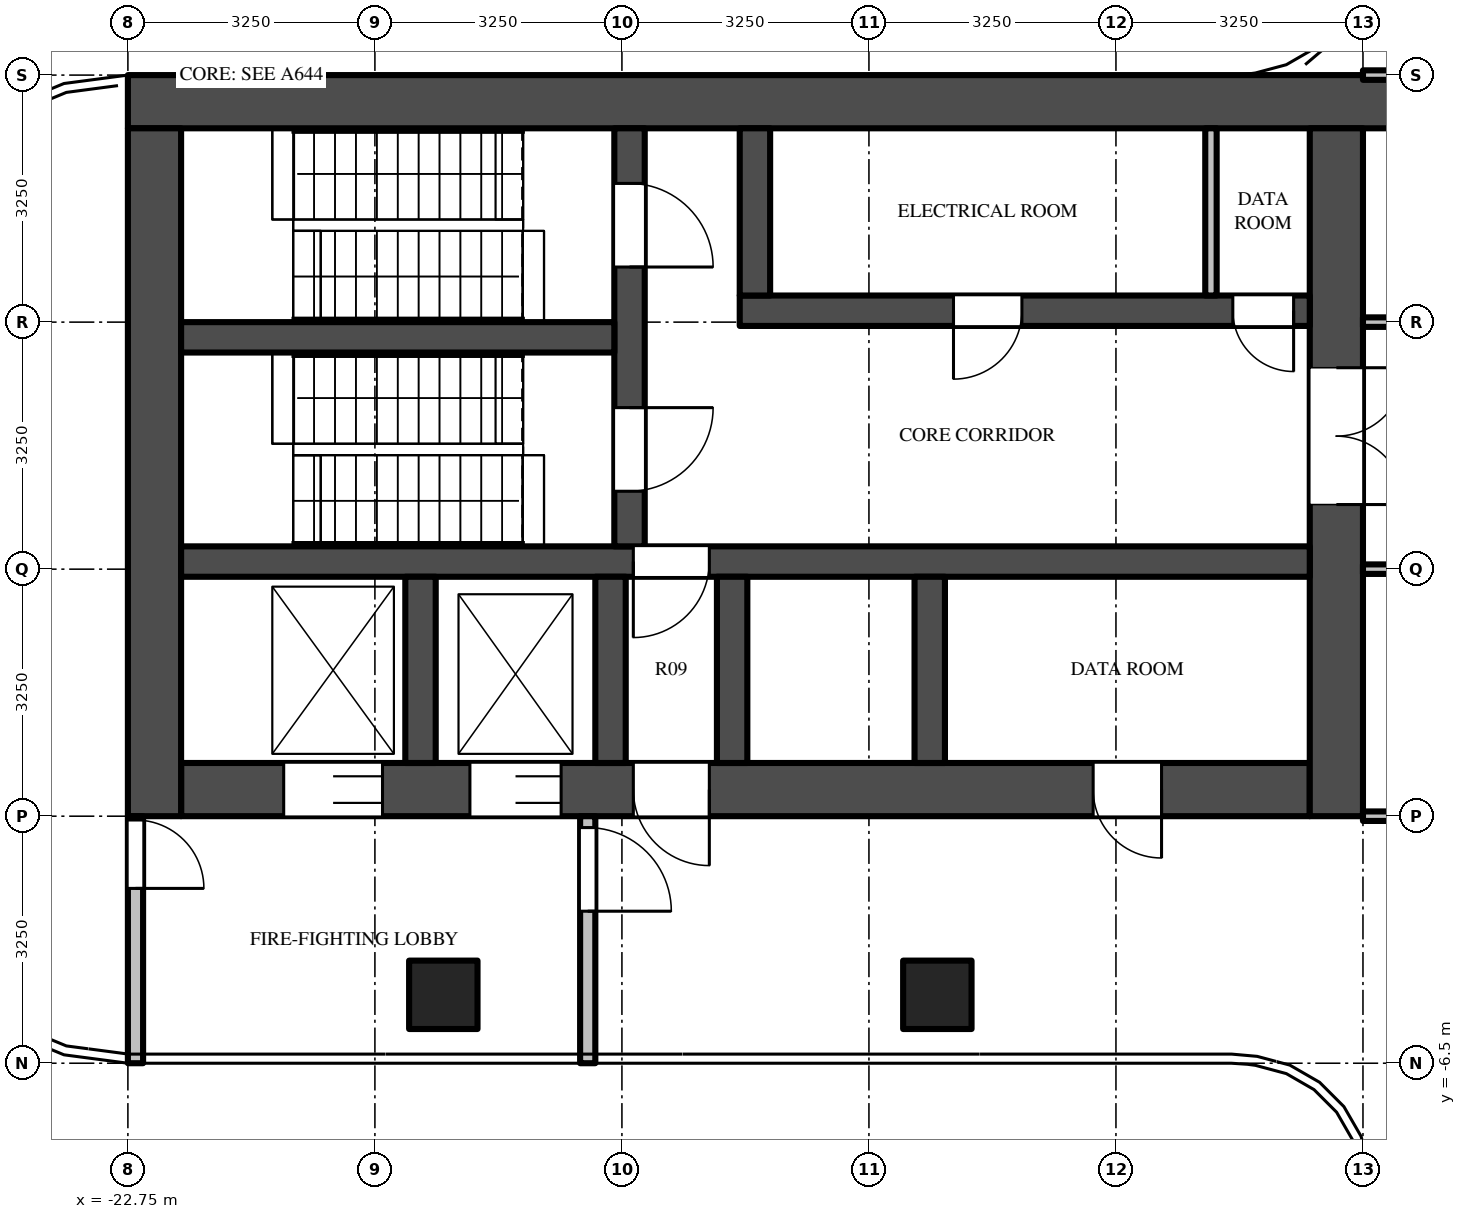
"""IFC4 building model, lengths in metres.
Left out: names, types, materials, properties, quantities, classifications, styles, units other than length and angle.
Written with IfcOpenShell. Run it as: python <this file> out.ifc"""

import sys

from ifc_helpers import new_model, si_unit, direction, frame, frame_2d, origin, origin_2d, place, context, subcontext, project, spatial, rectangle, extrude, source, transform, mapped, element, fill, save


model = new_model("IFC4")
c1 = context("Model", 3, precision=1e-05, world=origin(), true_north=direction((0.0, 1.0)))
c2 = subcontext(c1, "Body", "Model", "MODEL_VIEW")
j1 = project(units=[si_unit("LENGTHUNIT", "METRE"), si_unit("PLANEANGLEUNIT", "RADIAN")], contexts=[c1])
p1 = place(None, origin())
s1 = spatial("IfcSite", under=j1, at=p1, CompositionType="ELEMENT")
p2 = place(p1, origin())
s2 = spatial("IfcBuilding", under=s1, at=p2, CompositionType="ELEMENT")
p3 = place(p2, frame((0.0, 0.0, 330.1)))
s3 = spatial("IfcBuildingStorey", under=s2, at=p3, CompositionType="ELEMENT", Elevation=330.1)
m1 = source(origin(), c2, "Body", "SweptSolid", [
    extrude(rectangle(XDim=0.9, YDim=0.9, at=origin_2d()), origin(), (0.0, 0.0, 1.0), 8.0),
])
for number, where, z_axis, x_axis in (
    (1, (-12.1, -5.6, 0.0), (0.0, 0.0, 1.0), (1.0, 0.0, 0.0)),
    (2, (-18.6, -5.6, 0.0), (0.0, 0.0, 1.0), (1.0, 0.0, 0.0)),
):
    element("IfcColumn", number, at=place(p3, frame(where, z_axis=z_axis, x_axis=x_axis)), inside=s3, PredefinedType="COLUMN", context=c2, shape_type="MappedRepresentation", body=[
        mapped(m1, transform((0.0, 0.0, 0.0))),
    ])
m2 = source(origin(), c2, "Body", "SweptSolid", [
    extrude(rectangle(XDim=16.7, YDim=0.7, at=frame_2d((8.35, 0.0))), origin(), (0.0, 0.0, 1.0), 7.75),
])
p4 = place(p3, frame((-6.05, 6.15, 0.0), z_axis=(0.0, 0.0, 1.0), x_axis=(-1.0, 0.0, 0.0)))
e3 = element("IfcWall", 3, at=p4, inside=s3, PredefinedType="SHEAR", context=c2, shape_type="MappedRepresentation", body=[
    mapped(m2, transform((0.0, 0.0, 0.0))),
])
m3 = source(origin(), c2, "Body", "SweptSolid", [
    extrude(rectangle(XDim=14.85, YDim=0.7, at=frame_2d((7.425, 0.0))), origin(), (0.0, 0.0, 1.0), 7.75),
])
p5 = place(p3, frame((-7.2, -2.9, 0.0), z_axis=(0.0, 0.0, 1.0), x_axis=(-1.0, 0.0, 0.0)))
e4 = element("IfcWall", 4, at=p5, inside=s3, PredefinedType="SHEAR", context=c2, shape_type="MappedRepresentation", body=[
    mapped(m3, transform((0.0, 0.0, 0.0))),
])
m4 = source(origin(), c2, "Body", "SweptSolid", [
    extrude(rectangle(XDim=1.3, YDim=2.1, at=frame_2d((0.65, 1.05))), frame((0.0, 0.36, 0.0), z_axis=(0.0, -1.0, 0.0), x_axis=(1.0, 0.0, 0.0)), (0.0, 0.0, 1.0), 0.72),
])
p6 = place(p5, frame((12.2, 0.0, 0.0)))
e5 = element("IfcOpeningElement", 5, at=p6, cuts=e4, PredefinedType="OPENING", context=c2, shape_type="MappedRepresentation", body=[
    mapped(m4, transform((0.0, 0.0, 0.0))),
])
m5 = source(origin(), c2, "Body", "SweptSolid", [
    extrude(rectangle(XDim=1.2, YDim=2.1, at=frame_2d((0.6, 1.05))), frame((0.0, 0.36, 0.0), z_axis=(0.0, -1.0, 0.0), x_axis=(1.0, 0.0, 0.0)), (0.0, 0.0, 1.0), 0.72),
])
p7 = place(p5, frame((9.85, 0.0, 0.0)))
e6 = element("IfcOpeningElement", 6, at=p7, cuts=e4, PredefinedType="OPENING", context=c2, shape_type="MappedRepresentation", body=[
    mapped(m5, transform((0.0, 0.0, 0.0))),
])
m6 = source(origin(), c2, "Body", "SweptSolid", [
    extrude(rectangle(XDim=1.0, YDim=2.1, at=frame_2d((0.5, 1.05))), frame((0.0, 0.36, 0.0), z_axis=(0.0, -1.0, 0.0), x_axis=(1.0, 0.0, 0.0)), (0.0, 0.0, 1.0), 0.72),
])
p8 = place(p5, frame((7.9, 0.0, 0.0)))
e7 = element("IfcOpeningElement", 7, at=p8, cuts=e4, PredefinedType="OPENING", context=c2, shape_type="MappedRepresentation", body=[
    mapped(m6, transform((0.0, 0.0, 0.0))),
])
m7 = source(origin(), c2, "Body", "SweptSolid", [
    extrude(rectangle(XDim=0.9, YDim=2.1, at=frame_2d((0.45, 1.05))), frame((0.0, 0.36, 0.0), z_axis=(0.0, -1.0, 0.0), x_axis=(1.0, 0.0, 0.0)), (0.0, 0.0, 1.0), 0.72),
])
p9 = place(p5, frame((1.95, 0.0, 0.0)))
e8 = element("IfcOpeningElement", 8, at=p9, cuts=e4, PredefinedType="OPENING", context=c2, shape_type="MappedRepresentation", body=[
    mapped(m7, transform((0.0, 0.0, 0.0))),
])
m8 = source(origin(), c2, "Body", "SweptSolid", [
    extrude(rectangle(XDim=9.05, YDim=0.7, at=frame_2d((4.525, 0.0))), origin(), (0.0, 0.0, 1.0), 7.75),
])
p10 = place(p3, frame((-6.85, 5.8, 0.0), z_axis=(0.0, 0.0, 1.0), x_axis=(0.0, -1.0, 0.0)))
e9 = element("IfcWall", 9, at=p10, inside=s3, PredefinedType="SHEAR", context=c2, shape_type="MappedRepresentation", body=[
    mapped(m8, transform((0.0, 0.0, 0.0))),
])
m9 = source(origin(), c2, "Body", "SweptSolid", [
    extrude(rectangle(XDim=1.8, YDim=2.1, at=frame_2d((0.9, 1.05))), frame((0.0, 0.36, 0.0), z_axis=(0.0, -1.0, 0.0), x_axis=(1.0, 0.0, 0.0)), (0.0, 0.0, 1.0), 0.72),
])
p11 = place(p10, frame((3.15, 0.0, 0.0)))
e10 = element("IfcOpeningElement", 10, at=p11, cuts=e9, PredefinedType="OPENING", context=c2, shape_type="MappedRepresentation", body=[
    mapped(m9, transform((0.0, 0.0, 0.0))),
])
p12 = place(p3, frame((-22.4, 5.8, 0.0), z_axis=(0.0, 0.0, 1.0), x_axis=(0.0, -1.0, 0.0)))
e11 = element("IfcWall", 11, at=p12, inside=s3, PredefinedType="SHEAR", context=c2, shape_type="MappedRepresentation", body=[
    mapped(m8, transform((0.0, 0.0, 0.0))),
])
m10 = source(origin(), c2, "Body", "SweptSolid", [
    extrude(rectangle(XDim=7.5, YDim=0.4, at=frame_2d((3.75, 0.0))), origin(), (0.0, 0.0, 1.0), 7.75),
])
p13 = place(p3, frame((-7.2, 3.4, 0.0), z_axis=(0.0, 0.0, 1.0), x_axis=(-1.0, 0.0, 0.0)))
e12 = element("IfcWall", 12, at=p13, inside=s3, PredefinedType="SHEAR", context=c2, shape_type="MappedRepresentation", body=[
    mapped(m10, transform((0.0, 0.0, 0.0))),
])
m11 = source(origin(), c2, "Body", "SweptSolid", [
    extrude(rectangle(XDim=0.8, YDim=2.1, at=frame_2d((0.4, 1.05))), frame((0.0, 0.21, 0.0), z_axis=(0.0, -1.0, 0.0), x_axis=(1.0, 0.0, 0.0)), (0.0, 0.0, 1.0), 0.42),
])
p14 = place(p13, frame((0.212, 0.0, 0.0)))
e13 = element("IfcOpeningElement", 13, at=p14, cuts=e12, PredefinedType="OPENING", context=c2, shape_type="MappedRepresentation", body=[
    mapped(m11, transform((0.0, 0.0, 0.0))),
])
m12 = source(origin(), c2, "Body", "SweptSolid", [
    extrude(rectangle(XDim=0.9, YDim=2.1, at=frame_2d((0.45, 1.05))), frame((0.0, 0.21, 0.0), z_axis=(0.0, -1.0, 0.0), x_axis=(1.0, 0.0, 0.0)), (0.0, 0.0, 1.0), 0.42),
])
p15 = place(p13, frame((3.788, 0.0, 0.0)))
e14 = element("IfcOpeningElement", 14, at=p15, cuts=e12, PredefinedType="OPENING", context=c2, shape_type="MappedRepresentation", body=[
    mapped(m12, transform((0.0, 0.0, 0.0))),
])
m13 = source(origin(), c2, "Body", "SweptSolid", [
    extrude(rectangle(XDim=14.85, YDim=0.4, at=frame_2d((7.425, 0.0))), origin(), (0.0, 0.0, 1.0), 7.75),
])
p16 = place(p3, frame((-7.2, 0.1, 0.0), z_axis=(0.0, 0.0, 1.0), x_axis=(-1.0, 0.0, 0.0)))
e15 = element("IfcWall", 15, at=p16, inside=s3, PredefinedType="SHEAR", context=c2, shape_type="MappedRepresentation", body=[
    mapped(m13, transform((0.0, 0.0, 0.0))),
])
m14 = source(origin(), c2, "Body", "SweptSolid", [
    extrude(rectangle(XDim=1.0, YDim=2.1, at=frame_2d((0.5, 1.05))), frame((0.0, 0.21, 0.0), z_axis=(0.0, -1.0, 0.0), x_axis=(1.0, 0.0, 0.0)), (0.0, 0.0, 1.0), 0.42),
])
p17 = place(p16, frame((7.9, 0.0, 0.0)))
e16 = element("IfcOpeningElement", 16, at=p17, cuts=e15, PredefinedType="OPENING", context=c2, shape_type="MappedRepresentation", body=[
    mapped(m14, transform((0.0, 0.0, 0.0))),
])
m15 = source(origin(), c2, "Body", "SweptSolid", [
    extrude(rectangle(XDim=5.5, YDim=0.4, at=frame_2d((2.75, 0.0))), origin(), (0.0, 0.0, 1.0), 7.75),
])
p18 = place(p3, frame((-16.15, 5.8, 0.0), z_axis=(0.0, 0.0, 1.0), x_axis=(0.0, -1.0, 0.0)))
e17 = element("IfcWall", 17, at=p18, inside=s3, PredefinedType="SHEAR", context=c2, shape_type="MappedRepresentation", body=[
    mapped(m15, transform((0.0, 0.0, 0.0))),
])
m16 = source(origin(), c2, "Body", "SweptSolid", [
    extrude(rectangle(XDim=1.1, YDim=2.1, at=frame_2d((0.55, 1.05))), frame((0.0, 0.21, 0.0), z_axis=(0.0, -1.0, 0.0), x_axis=(1.0, 0.0, 0.0)), (0.0, 0.0, 1.0), 0.42),
])
p19 = place(p18, frame((0.725, 0.0, 0.0)))
e18 = element("IfcOpeningElement", 18, at=p19, cuts=e17, PredefinedType="OPENING", context=c2, shape_type="MappedRepresentation", body=[
    mapped(m16, transform((0.0, 0.0, 0.0))),
])
p20 = place(p18, frame((3.675, 0.0, 0.0)))
e19 = element("IfcOpeningElement", 19, at=p20, cuts=e17, PredefinedType="OPENING", context=c2, shape_type="MappedRepresentation", body=[
    mapped(m16, transform((0.0, 0.0, 0.0))),
])
m17 = source(origin(), c2, "Body", "SweptSolid", [
    extrude(rectangle(XDim=5.7, YDim=0.4, at=frame_2d((2.85, 0.0))), origin(), (0.0, 0.0, 1.0), 7.75),
])
p21 = place(p3, frame((-16.35, 3.05, 0.0), z_axis=(0.0, 0.0, 1.0), x_axis=(-1.0, 0.0, 0.0)))
e20 = element("IfcWall", 20, at=p21, inside=s3, PredefinedType="SHEAR", context=c2, shape_type="MappedRepresentation", body=[
    mapped(m17, transform((0.0, 0.0, 0.0))),
])
m18 = source(origin(), c2, "Body", "SweptSolid", [
    extrude(rectangle(XDim=2.2, YDim=0.4, at=frame_2d((1.1, 0.0))), origin(), (0.0, 0.0, 1.0), 7.75),
])
p22 = place(p3, frame((-14.5, 5.8, 0.0), z_axis=(0.0, 0.0, 1.0), x_axis=(0.0, -1.0, 0.0)))
e21 = element("IfcWall", 21, at=p22, inside=s3, PredefinedType="SHEAR", context=c2, shape_type="MappedRepresentation", body=[
    mapped(m18, transform((0.0, 0.0, 0.0))),
])
m19 = source(origin(), c2, "Body", "SweptSolid", [
    extrude(rectangle(XDim=2.45, YDim=0.4, at=frame_2d((1.225, 0.0))), origin(), (0.0, 0.0, 1.0), 7.75),
])
for number, where, z_axis, x_axis in (
    (22, (-12.2, -0.1, 0.0), (0.0, 0.0, 1.0), (0.0, -1.0, 0.0)),
    (23, (-14.8, -0.1, 0.0), (0.0, 0.0, 1.0), (0.0, -1.0, 0.0)),
    (24, (-16.4, -0.1, 0.0), (0.0, 0.0, 1.0), (0.0, -1.0, 0.0)),
    (25, (-18.9, -0.1, 0.0), (0.0, 0.0, 1.0), (0.0, -1.0, 0.0)),
):
    element("IfcWall", number, at=place(p3, frame(where, z_axis=z_axis, x_axis=x_axis)), inside=s3, PredefinedType="SHEAR", context=c2, shape_type="MappedRepresentation", body=[
        mapped(m19, transform((0.0, 0.0, 0.0))),
    ])
m20 = source(origin(), c2, "Body", "SweptSolid", [
    extrude(rectangle(XDim=3.25, YDim=0.2, at=frame_2d((1.625, 0.0))), origin(), (0.0, 0.0, 1.0), 7.75),
])
p23 = place(p3, frame((-16.7, -3.25, 0.0), z_axis=(0.0, 0.0, 1.0), x_axis=(0.0, -1.0, 0.0)))
e26 = element("IfcWall", 26, at=p23, inside=s3, PredefinedType="PARTITIONING", context=c2, shape_type="MappedRepresentation", body=[
    mapped(m20, transform((0.0, 0.0, 0.0))),
])
m21 = source(origin(), c2, "Body", "SweptSolid", [
    extrude(rectangle(XDim=1.1, YDim=2.1, at=frame_2d((0.55, 1.05))), frame((0.0, 0.11, 0.0), z_axis=(0.0, -1.0, 0.0), x_axis=(1.0, 0.0, 0.0)), (0.0, 0.0, 1.0), 0.22),
])
p24 = place(p23, frame((0.15, 0.0, 0.0)))
e27 = element("IfcOpeningElement", 27, at=p24, cuts=e26, PredefinedType="OPENING", context=c2, shape_type="MappedRepresentation", body=[
    mapped(m21, transform((0.0, 0.0, 0.0))),
])
p25 = place(p3, frame((-22.65, -3.25, 0.0), z_axis=(0.0, 0.0, 1.0), x_axis=(0.0, -1.0, 0.0)))
e28 = element("IfcWall", 28, at=p25, inside=s3, PredefinedType="PARTITIONING", context=c2, shape_type="MappedRepresentation", body=[
    mapped(m20, transform((0.0, 0.0, 0.0))),
])
m22 = source(origin(), c2, "Body", "SweptSolid", [
    extrude(rectangle(XDim=0.9, YDim=2.1, at=frame_2d((0.45, 1.05))), frame((0.0, 0.11, 0.0), z_axis=(0.0, -1.0, 0.0), x_axis=(1.0, 0.0, 0.0)), (0.0, 0.0, 1.0), 0.22),
])
p26 = place(p25, frame((0.05, 0.0, 0.0)))
e29 = element("IfcOpeningElement", 29, at=p26, cuts=e28, PredefinedType="OPENING", context=c2, shape_type="MappedRepresentation", body=[
    mapped(m22, transform((0.0, 0.0, 0.0))),
])
m23 = source(origin(), c2, "Body", "SweptSolid", [
    extrude(rectangle(XDim=2.2, YDim=0.15, at=frame_2d((1.1, 0.0))), origin(), (0.0, 0.0, 1.0), 7.75),
])
p27 = place(p3, frame((-8.5, 5.8, 0.0), z_axis=(0.0, 0.0, 1.0), x_axis=(0.0, -1.0, 0.0)))
e30 = element("IfcWall", 30, at=p27, inside=s3, PredefinedType="PARTITIONING", context=c2, shape_type="MappedRepresentation", body=[
    mapped(m23, transform((0.0, 0.0, 0.0))),
])
m24 = source(origin(), c2, "Body", "SweptSolid", [
    extrude(rectangle(XDim=5.363, YDim=0.125, at=frame_2d((2.681, 0.0))), origin(), (0.0, 0.0, 1.0), 7.046),
])
p28 = place(p3, frame((-1.137, -3.25, 0.0), z_axis=(0.0, 0.0, 1.0), x_axis=(-1.0, 0.0, 0.0)))
e31 = element("IfcWall", 31, at=p28, inside=s3, PredefinedType="PARTITIONING", context=c2, shape_type="MappedRepresentation", body=[
    mapped(m24, transform((0.0, 0.0, 0.0))),
])
m25 = source(origin(), c2, "Body", "SweptSolid", [
    extrude(rectangle(XDim=1.0, YDim=2.1, at=frame_2d((0.5, 1.05))), frame((0.0, 0.073, 0.0), z_axis=(0.0, -1.0, 0.0), x_axis=(1.0, 0.0, 0.0)), (0.0, 0.0, 1.0), 0.145),
])
p29 = place(p28, frame((4.012, 0.0, 0.0)))
e32 = element("IfcOpeningElement", 32, at=p29, cuts=e31, PredefinedType="OPENING", context=c2, shape_type="MappedRepresentation", body=[
    mapped(m25, transform((0.0, 0.0, 0.0))),
])
p30 = place(p3, frame((-6.5, 0.0, 0.0), z_axis=(0.0, 0.0, 1.0), x_axis=(1.0, 0.0, 0.0)))
e33 = element("IfcWall", 33, at=p30, inside=s3, PredefinedType="PARTITIONING", context=c2, shape_type="MappedRepresentation", body=[
    mapped(m24, transform((0.0, 0.0, 0.0))),
])
p31 = place(p3, frame((-6.5, 3.25, 0.0), z_axis=(0.0, 0.0, 1.0), x_axis=(1.0, 0.0, 0.0)))
e34 = element("IfcWall", 34, at=p31, inside=s3, PredefinedType="PARTITIONING", context=c2, shape_type="MappedRepresentation", body=[
    mapped(m24, transform((0.0, 0.0, 0.0))),
])
p32 = place(p31, frame((1.3, 0.0, 0.0)))
e35 = element("IfcOpeningElement", 35, at=p32, cuts=e34, PredefinedType="OPENING", context=c2, shape_type="MappedRepresentation", body=[
    mapped(m25, transform((0.0, 0.0, 0.0))),
])
m26 = source(origin(), c2, "Body", "SweptSolid", [
    extrude(rectangle(XDim=5.363, YDim=0.125, at=frame_2d((2.681, 0.0))), origin(), (0.0, 0.0, 1.0), 6.83),
])
p33 = place(p3, frame((-6.5, 6.5, 0.0), z_axis=(0.0, 0.0, 1.0), x_axis=(1.0, 0.0, 0.0)))
e36 = element("IfcWall", 36, at=p33, inside=s3, PredefinedType="PARTITIONING", context=c2, shape_type="MappedRepresentation", body=[
    mapped(m26, transform((0.0, 0.0, 0.0))),
])
m27 = source(origin(), c2, "Body", "SweptSolid", [
    extrude(rectangle(XDim=1.3, YDim=2.1, at=frame_2d((0.65, 1.05))), frame((0.0, -0.275, 0.0), z_axis=(0.0, -1.0, 0.0), x_axis=(1.0, 0.0, 0.0)), (0.0, 0.0, 1.0), 0.05),
])
p34 = place(p6, origin())
e37 = element("IfcDoor", 37, at=p34, inside=s3, OperationType="DOUBLE_DOOR_SLIDING", PredefinedType="DOOR", context=c2, shape_type="MappedRepresentation", body=[
    mapped(m27, transform((0.0, 0.0, 0.0))),
])
fill(e5, e37)
m28 = source(origin(), c2, "Body", "SweptSolid", [
    extrude(rectangle(XDim=1.2, YDim=2.1, at=frame_2d((0.6, 1.05))), frame((0.0, -0.275, 0.0), z_axis=(0.0, -1.0, 0.0), x_axis=(1.0, 0.0, 0.0)), (0.0, 0.0, 1.0), 0.05),
])
p35 = place(p7, origin())
e38 = element("IfcDoor", 38, at=p35, inside=s3, OperationType="DOUBLE_DOOR_SLIDING", PredefinedType="DOOR", context=c2, shape_type="MappedRepresentation", body=[
    mapped(m28, transform((0.0, 0.0, 0.0))),
])
fill(e6, e38)
m29 = source(origin(), c2, "Body", "SweptSolid", [
    extrude(rectangle(XDim=1.8, YDim=2.1, at=frame_2d((0.9, 1.05))), frame((0.0, -0.275, 0.0), z_axis=(0.0, -1.0, 0.0), x_axis=(1.0, 0.0, 0.0)), (0.0, 0.0, 1.0), 0.05),
])
p36 = place(p11, origin())
e39 = element("IfcDoor", 39, at=p36, inside=s3, OperationType="DOUBLE_DOOR_SINGLE_SWING", PredefinedType="DOOR", context=c2, shape_type="MappedRepresentation", body=[
    mapped(m29, transform((0.0, 0.0, 0.0))),
])
fill(e10, e39)
m30 = source(origin(), c2, "Body", "SweptSolid", [
    extrude(rectangle(XDim=1.1, YDim=2.1, at=frame_2d((0.55, 1.05))), frame((0.0, 0.025, 0.0), z_axis=(0.0, -1.0, 0.0), x_axis=(1.0, 0.0, 0.0)), (0.0, 0.0, 1.0), 0.05),
])
p37 = place(p19, origin())
e40 = element("IfcDoor", 40, at=p37, inside=s3, OperationType="SINGLE_SWING_RIGHT", PredefinedType="DOOR", context=c2, shape_type="MappedRepresentation", body=[
    mapped(m30, transform((0.0, 0.0, 0.0))),
])
fill(e18, e40)
p38 = place(p20, origin())
e41 = element("IfcDoor", 41, at=p38, inside=s3, OperationType="SINGLE_SWING_LEFT", PredefinedType="DOOR", context=c2, shape_type="MappedRepresentation", body=[
    mapped(m30, transform((0.0, 0.0, 0.0))),
])
fill(e19, e41)
m31 = source(origin(), c2, "Body", "SweptSolid", [
    extrude(rectangle(XDim=1.0, YDim=2.1, at=frame_2d((0.5, 1.05))), frame((0.0, 0.025, 0.0), z_axis=(0.0, -1.0, 0.0), x_axis=(1.0, 0.0, 0.0)), (0.0, 0.0, 1.0), 0.05),
])
p39 = place(p17, origin())
e42 = element("IfcDoor", 42, at=p39, inside=s3, OperationType="SINGLE_SWING_RIGHT", PredefinedType="DOOR", context=c2, shape_type="MappedRepresentation", body=[
    mapped(m31, transform((0.0, 0.0, 0.0))),
])
fill(e16, e42)
m32 = source(origin(), c2, "Body", "SweptSolid", [
    extrude(rectangle(XDim=1.0, YDim=2.1, at=frame_2d((0.5, 1.05))), frame((0.0, -0.275, 0.0), z_axis=(0.0, -1.0, 0.0), x_axis=(1.0, 0.0, 0.0)), (0.0, 0.0, 1.0), 0.05),
])
p40 = place(p8, origin())
e43 = element("IfcDoor", 43, at=p40, inside=s3, OperationType="SINGLE_SWING_LEFT", PredefinedType="DOOR", context=c2, shape_type="MappedRepresentation", body=[
    mapped(m32, transform((0.0, 0.0, 0.0))),
])
fill(e7, e43)
p41 = place(p24, origin())
e44 = element("IfcDoor", 44, at=p41, inside=s3, OperationType="SINGLE_SWING_RIGHT", PredefinedType="DOOR", context=c2, shape_type="MappedRepresentation", body=[
    mapped(m30, transform((0.0, 0.0, 0.0))),
])
fill(e27, e44)
m33 = source(origin(), c2, "Body", "SweptSolid", [
    extrude(rectangle(XDim=0.9, YDim=2.1, at=frame_2d((0.45, 1.05))), frame((0.0, 0.025, 0.0), z_axis=(0.0, -1.0, 0.0), x_axis=(1.0, 0.0, 0.0)), (0.0, 0.0, 1.0), 0.05),
])
p42 = place(p26, origin())
e45 = element("IfcDoor", 45, at=p42, inside=s3, OperationType="SINGLE_SWING_RIGHT", PredefinedType="DOOR", context=c2, shape_type="MappedRepresentation", body=[
    mapped(m33, transform((0.0, 0.0, 0.0))),
])
fill(e29, e45)
m34 = source(origin(), c2, "Body", "SweptSolid", [
    extrude(rectangle(XDim=0.8, YDim=2.1, at=frame_2d((0.4, 1.05))), frame((0.0, 0.025, 0.0), z_axis=(0.0, -1.0, 0.0), x_axis=(1.0, 0.0, 0.0)), (0.0, 0.0, 1.0), 0.05),
])
p43 = place(p14, origin())
e46 = element("IfcDoor", 46, at=p43, inside=s3, OperationType="SINGLE_SWING_LEFT", PredefinedType="DOOR", context=c2, shape_type="MappedRepresentation", body=[
    mapped(m34, transform((0.0, 0.0, 0.0))),
])
fill(e13, e46)
p44 = place(p15, origin())
e47 = element("IfcDoor", 47, at=p44, inside=s3, OperationType="SINGLE_SWING_RIGHT", PredefinedType="DOOR", context=c2, shape_type="MappedRepresentation", body=[
    mapped(m33, transform((0.0, 0.0, 0.0))),
])
fill(e14, e47)
m35 = source(origin(), c2, "Body", "SweptSolid", [
    extrude(rectangle(XDim=0.9, YDim=2.1, at=frame_2d((0.45, 1.05))), frame((0.0, -0.275, 0.0), z_axis=(0.0, -1.0, 0.0), x_axis=(1.0, 0.0, 0.0)), (0.0, 0.0, 1.0), 0.05),
])
p45 = place(p9, origin())
e48 = element("IfcDoor", 48, at=p45, inside=s3, OperationType="SINGLE_SWING_LEFT", PredefinedType="DOOR", context=c2, shape_type="MappedRepresentation", body=[
    mapped(m35, transform((0.0, 0.0, 0.0))),
])
fill(e8, e48)
save(model, sys.argv[1])
